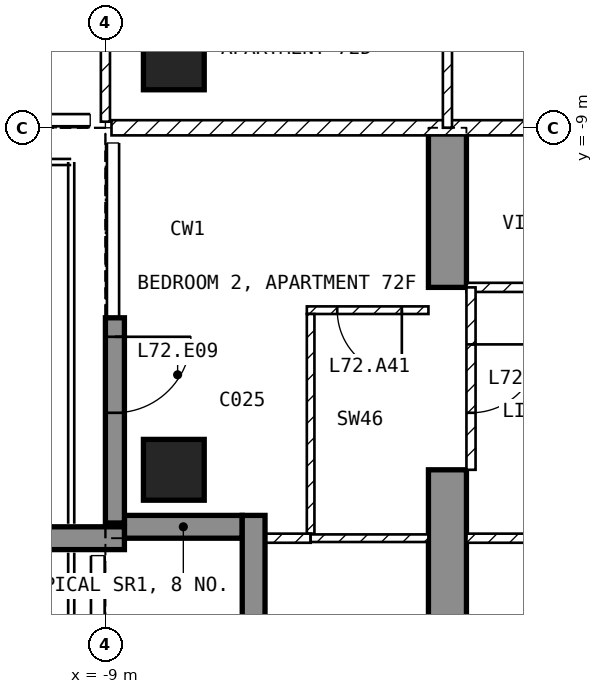
"""IFC4 building model, lengths in metres.
Left out: names, types, materials, properties, quantities, classifications, styles, units other than length and angle.
Written with IfcOpenShell. Run it as: python <this file> out.ifc"""

import sys

from ifc_helpers import new_model, si_unit, direction, frame, frame_2d, origin, origin_2d, place, context, subcontext, project, spatial, polyline, rectangle, outline, extrude, element, fill, save


model = new_model("IFC4")
c1 = context("Model", 3, precision=1e-05, world=origin(), true_north=direction((0.0, 1.0)))
c2 = subcontext(c1, "Body", "Model", "MODEL_VIEW")
j1 = project(units=[si_unit("LENGTHUNIT", "METRE"), si_unit("PLANEANGLEUNIT", "RADIAN")], contexts=[c1])
p1 = place(None, origin())
s1 = spatial("IfcSite", under=j1, at=p1, CompositionType="ELEMENT")
p2 = place(p1, origin())
s2 = spatial("IfcBuilding", under=s1, at=p2, CompositionType="ELEMENT")
p3 = place(p2, frame((0.0, 0.0, 281.5)))
s3 = spatial("IfcBuildingStorey", under=s2, at=p3, CompositionType="ELEMENT", Elevation=281.5)
for number, where, z_axis, x_axis in (
    (1, (-8.1, -13.5, -0.25), (0.0, 0.0, 1.0), (1.0, 0.0, 0.0)),
    (2, (-8.1, -8.1, -0.25), (0.0, 0.0, 1.0), (1.0, 0.0, 0.0)),
):
    element("IfcColumn", number, at=place(p3, frame(where, z_axis=z_axis, x_axis=x_axis)), inside=s3, PredefinedType="COLUMN", context=c2, shape_type="SweptSolid", body=[
        extrude(rectangle(XDim=0.8, YDim=0.8, at=origin_2d()), origin(), (0.0, 0.0, 1.0), 3.45),
    ])
p4 = place(p3, frame((-4.75, -16.7, -0.25), z_axis=(1.0, 0.0, 0.0), x_axis=(0.0, 1.0, 0.0)))
e3 = element("IfcWall", 3, at=p4, inside=s3, PredefinedType="SHEAR", context=c2, shape_type="SweptSolid", body=[
    extrude(outline(polyline([(0.0, 0.0), (3.2, 0.0), (3.2, 2.65), (5.6, 2.65), (5.6, 0.0), (7.7, 0.0), (7.7, 3.45), (0.0, 3.45), (0.0, 0.0)])), origin(), (0.0, 0.0, 1.0), 0.5),
])
p5 = place(p3, frame((-8.875, -11.5, 0.0), z_axis=(0.0, 0.0, 1.0), x_axis=(0.0, -1.0, 0.0)))
e4 = element("IfcWall", 4, at=p5, inside=s3, PredefinedType="SOLIDWALL", context=c2, shape_type="SweptSolid", body=[
    extrude(rectangle(XDim=2.7, YDim=0.25, at=frame_2d((1.35, 0.0))), origin(), (0.0, 0.0, 1.0), 3.2),
])
p6 = place(p5, frame((0.25, 0.0, 0.0)))
e5 = element("IfcOpeningElement", 5, at=p6, cuts=e4, PredefinedType="OPENING", context=c2, shape_type="SweptSolid", body=[
    extrude(rectangle(XDim=1.0, YDim=2.4, at=frame_2d((0.5, 1.2))), frame((0.0, 0.135, 0.0), z_axis=(0.0, -1.0, 0.0), x_axis=(1.0, 0.0, 0.0)), (0.0, 0.0, 1.0), 0.27),
])
p7 = place(p3, frame((-8.75, -14.25, 0.0), z_axis=(0.0, 0.0, 1.0), x_axis=(1.0, 0.0, 0.0)))
e6 = element("IfcWall", 6, at=p7, inside=s3, PredefinedType="SOLIDWALL", context=c2, shape_type="SweptSolid", body=[
    extrude(rectangle(XDim=1.55, YDim=0.3, at=frame_2d((0.775, 0.0))), origin(), (0.0, 0.0, 1.0), 3.2),
])
p8 = place(p3, frame((-7.05, -14.1, 0.0), z_axis=(0.0, 0.0, 1.0), x_axis=(0.0, -1.0, 0.0)))
e7 = element("IfcWall", 7, at=p8, inside=s3, PredefinedType="SOLIDWALL", context=c2, shape_type="SweptSolid", body=[
    extrude(rectangle(XDim=1.8, YDim=0.3, at=frame_2d((0.9, 0.0))), origin(), (0.0, 0.0, 1.0), 3.2),
])
p9 = place(p3, frame((-8.75, -14.4, 0.0), z_axis=(0.0, 0.0, 1.0), x_axis=(-1.0, 0.0, 0.0)))
e8 = element("IfcWall", 8, at=p9, inside=s3, PredefinedType="SOLIDWALL", context=c2, shape_type="SweptSolid", body=[
    extrude(rectangle(XDim=2.95, YDim=0.3, at=frame_2d((1.475, 0.0))), origin(), (0.0, 0.0, 1.0), 3.2),
])
p10 = place(p3, frame((8.92, -9.0, 0.0), z_axis=(0.0, 0.0, 1.0), x_axis=(-1.0, 0.0, 0.0)))
e9 = element("IfcWall", 9, at=p10, inside=s3, PredefinedType="PARTITIONING", context=c2, shape_type="SweptSolid", body=[
    extrude(rectangle(XDim=17.84, YDim=0.2, at=frame_2d((8.92, 0.0))), origin(), (0.0, 0.0, 1.0), 3.2),
])
p11 = place(p10, frame((8.42, 0.0, 0.0)))
e10 = element("IfcOpeningElement", 10, at=p11, cuts=e9, PredefinedType="OPENING", context=c2, shape_type="SweptSolid", body=[
    extrude(rectangle(XDim=1.0, YDim=2.1, at=frame_2d((0.5, 1.05))), frame((0.0, 0.11, 0.0), z_axis=(0.0, -1.0, 0.0), x_axis=(1.0, 0.0, 0.0)), (0.0, 0.0, 1.0), 0.22),
])
p12 = place(p3, frame((-9.0, -1.3, 0.0), z_axis=(0.0, 0.0, 1.0), x_axis=(0.0, -1.0, 0.0)))
e11 = element("IfcWall", 11, at=p12, inside=s3, PredefinedType="PARTITIONING", context=c2, shape_type="SweptSolid", body=[
    extrude(rectangle(XDim=7.62, YDim=0.12, at=frame_2d((3.81, 0.0))), origin(), (0.0, 0.0, 1.0), 3.2),
])
p13 = place(p12, frame((1.15, 0.0, 0.0)))
e12 = element("IfcOpeningElement", 12, at=p13, cuts=e11, PredefinedType="OPENING", context=c2, shape_type="SweptSolid", body=[
    extrude(rectangle(XDim=0.9, YDim=2.1, at=frame_2d((0.45, 1.05))), frame((0.0, 0.07, 0.0), z_axis=(0.0, -1.0, 0.0), x_axis=(1.0, 0.0, 0.0)), (0.0, 0.0, 1.0), 0.14),
])
p14 = place(p3, frame((-4.5, -4.5, 0.0), z_axis=(0.0, 0.0, 1.0), x_axis=(0.0, -1.0, 0.0)))
e13 = element("IfcWall", 13, at=p14, inside=s3, PredefinedType="PARTITIONING", context=c2, shape_type="SweptSolid", body=[
    extrude(rectangle(XDim=4.5, YDim=0.12, at=frame_2d((2.25, 0.0))), origin(), (0.0, 0.0, 1.0), 3.2),
])
p15 = place(p14, frame((0.24, 0.0, 0.0)))
e14 = element("IfcOpeningElement", 14, at=p15, cuts=e13, PredefinedType="OPENING", context=c2, shape_type="SweptSolid", body=[
    extrude(rectangle(XDim=0.9, YDim=2.1, at=frame_2d((0.45, 1.05))), frame((0.0, 0.07, 0.0), z_axis=(0.0, -1.0, 0.0), x_axis=(1.0, 0.0, 0.0)), (0.0, 0.0, 1.0), 0.14),
])
p16 = place(p3, frame((2.1, -11.1, 0.0), z_axis=(0.0, 0.0, 1.0), x_axis=(-1.0, 0.0, 0.0)))
e15 = element("IfcWall", 15, at=p16, inside=s3, PredefinedType="PARTITIONING", context=c2, shape_type="SweptSolid", body=[
    extrude(rectangle(XDim=6.35, YDim=0.12, at=frame_2d((3.175, 0.0))), origin(), (0.0, 0.0, 1.0), 3.2),
])
p17 = place(p16, frame((2.725, 0.0, 0.0)))
e16 = element("IfcOpeningElement", 16, at=p17, cuts=e15, PredefinedType="OPENING", context=c2, shape_type="SweptSolid", body=[
    extrude(rectangle(XDim=0.9, YDim=2.1, at=frame_2d((0.45, 1.05))), frame((0.0, 0.07, 0.0), z_axis=(0.0, -1.0, 0.0), x_axis=(1.0, 0.0, 0.0)), (0.0, 0.0, 1.0), 0.14),
])
p18 = place(p3, frame((4.25, -14.4, 0.0), z_axis=(0.0, 0.0, 1.0), x_axis=(-1.0, 0.0, 0.0)))
e17 = element("IfcWall", 17, at=p18, inside=s3, PredefinedType="PARTITIONING", context=c2, shape_type="SweptSolid", body=[
    extrude(rectangle(XDim=8.5, YDim=0.12, at=frame_2d((4.25, 0.0))), origin(), (0.0, 0.0, 1.0), 3.2),
])
p19 = place(p18, frame((5.675, 0.0, 0.0)))
e18 = element("IfcOpeningElement", 18, at=p19, cuts=e17, PredefinedType="OPENING", context=c2, shape_type="SweptSolid", body=[
    extrude(rectangle(XDim=0.9, YDim=2.1, at=frame_2d((0.45, 1.05))), frame((0.0, 0.07, 0.0), z_axis=(0.0, -1.0, 0.0), x_axis=(1.0, 0.0, 0.0)), (0.0, 0.0, 1.0), 0.14),
])
p20 = place(p3, frame((-4.75, -11.4, 0.0), z_axis=(0.0, 0.0, 1.0), x_axis=(-1.0, 0.0, 0.0)))
e19 = element("IfcWall", 19, at=p20, inside=s3, PredefinedType="PARTITIONING", context=c2, shape_type="SweptSolid", body=[
    extrude(rectangle(XDim=1.6, YDim=0.1, at=frame_2d((0.8, 0.0))), origin(), (0.0, 0.0, 1.0), 3.2),
])
p21 = place(p20, frame((0.35, 0.0, 0.0)))
e20 = element("IfcOpeningElement", 20, at=p21, cuts=e19, PredefinedType="OPENING", context=c2, shape_type="SweptSolid", body=[
    extrude(rectangle(XDim=0.85, YDim=2.1, at=frame_2d((0.425, 1.05))), frame((0.0, 0.06, 0.0), z_axis=(0.0, -1.0, 0.0), x_axis=(1.0, 0.0, 0.0)), (0.0, 0.0, 1.0), 0.12),
])
p22 = place(p3, frame((-6.3, -11.45, 0.0), z_axis=(0.0, 0.0, 1.0), x_axis=(0.0, -1.0, 0.0)))
e21 = element("IfcWall", 21, at=p22, inside=s3, PredefinedType="PARTITIONING", context=c2, shape_type="SweptSolid", body=[
    extrude(rectangle(XDim=2.89, YDim=0.1, at=frame_2d((1.445, 0.0))), origin(), (0.0, 0.0, 1.0), 3.2),
])
p23 = place(p3, frame((-6.3, -14.4, 0.0), z_axis=(0.0, 0.0, 1.0), x_axis=(-1.0, 0.0, 0.0)))
e22 = element("IfcWall", 22, at=p23, inside=s3, PredefinedType="PARTITIONING", context=c2, shape_type="SweptSolid", body=[
    extrude(rectangle(XDim=0.82, YDim=0.12, at=frame_2d((0.41, 0.0))), origin(), (0.0, 0.0, 1.0), 3.2),
])
p24 = place(p3, frame((-4.75, -14.4, 0.0), z_axis=(0.0, 0.0, 1.0), x_axis=(-1.0, 0.0, 0.0)))
e23 = element("IfcWall", 23, at=p24, inside=s3, PredefinedType="PARTITIONING", context=c2, shape_type="SweptSolid", body=[
    extrude(rectangle(XDim=1.55, YDim=0.1, at=frame_2d((0.775, 0.0))), origin(), (0.0, 0.0, 1.0), 3.2),
])
p25 = place(p3, frame((-4.19, -11.1, 0.0), z_axis=(0.0, 0.0, 1.0), x_axis=(0.0, -1.0, 0.0)))
e24 = element("IfcWall", 24, at=p25, inside=s3, PredefinedType="PARTITIONING", context=c2, shape_type="SweptSolid", body=[
    extrude(rectangle(XDim=2.4, YDim=0.12, at=frame_2d((1.2, 0.0))), origin(), (0.0, 0.0, 1.0), 2.4),
])
p26 = place(p25, frame((0.75, 0.0, 0.0)))
e25 = element("IfcOpeningElement", 25, at=p26, cuts=e24, PredefinedType="OPENING", context=c2, shape_type="SweptSolid", body=[
    extrude(rectangle(XDim=0.9, YDim=2.1, at=frame_2d((0.45, 1.05))), frame((0.0, 0.07, 0.0), z_axis=(0.0, -1.0, 0.0), x_axis=(1.0, 0.0, 0.0)), (0.0, 0.0, 1.0), 0.14),
])
p27 = place(p6, origin())
e26 = element("IfcDoor", 26, at=p27, inside=s3, OperationType="SINGLE_SWING_LEFT", PredefinedType="DOOR", context=c2, shape_type="SweptSolid", body=[
    extrude(rectangle(XDim=1.0, YDim=2.4, at=frame_2d((0.5, 1.2))), frame((0.0, 0.025, 0.0), z_axis=(0.0, -1.0, 0.0), x_axis=(1.0, 0.0, 0.0)), (0.0, 0.0, 1.0), 0.05),
])
fill(e5, e26)
p28 = place(p21, origin())
e27 = element("IfcDoor", 27, at=p28, inside=s3, OperationType="SINGLE_SWING_LEFT", PredefinedType="DOOR", context=c2, shape_type="SweptSolid", body=[
    extrude(rectangle(XDim=0.85, YDim=2.1, at=frame_2d((0.425, 1.05))), frame((0.0, 0.025, 0.0), z_axis=(0.0, -1.0, 0.0), x_axis=(1.0, 0.0, 0.0)), (0.0, 0.0, 1.0), 0.05),
])
fill(e20, e27)
p29 = place(p26, origin())
e28 = element("IfcDoor", 28, at=p29, inside=s3, OperationType="SINGLE_SWING_LEFT", PredefinedType="DOOR", context=c2, shape_type="SweptSolid", body=[
    extrude(rectangle(XDim=0.9, YDim=2.1, at=frame_2d((0.45, 1.05))), frame((0.0, 0.025, 0.0), z_axis=(0.0, -1.0, 0.0), x_axis=(1.0, 0.0, 0.0)), (0.0, 0.0, 1.0), 0.05),
])
fill(e25, e28)
save(model, sys.argv[1])
